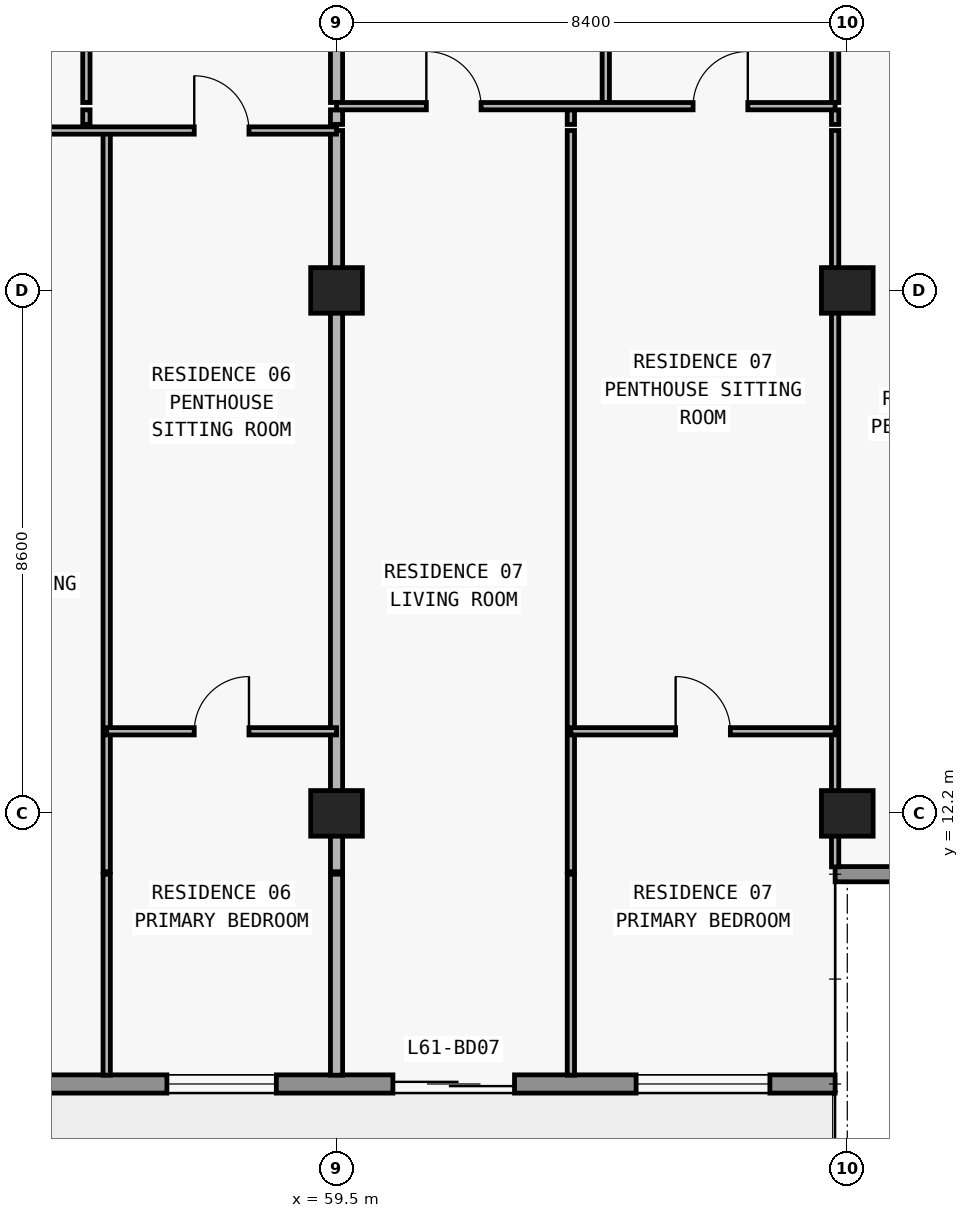
"""IFC4 building model, lengths in metres.
Left out: names, types, materials, properties, quantities, classifications, styles, units other than length and angle.
Written with IfcOpenShell. Run it as: python <this file> out.ifc"""

import sys

from ifc_helpers import new_model, si_unit, direction, frame, frame_2d, origin, origin_2d, place, context, subcontext, project, spatial, rectangle, extrude, element, fill, save


model = new_model("IFC4")
c1 = context("Model", 3, precision=1e-05, world=origin(), true_north=direction((0.0, 1.0)))
c2 = subcontext(c1, "Body", "Model", "MODEL_VIEW")
j1 = project(units=[si_unit("LENGTHUNIT", "METRE"), si_unit("PLANEANGLEUNIT", "RADIAN")], contexts=[c1])
p1 = place(None, origin())
s1 = spatial("IfcSite", under=j1, at=p1, CompositionType="ELEMENT")
p2 = place(p1, origin())
s2 = spatial("IfcBuilding", under=s1, at=p2, CompositionType="ELEMENT")
p3 = place(p2, frame((0.0, 0.0, 218.1)))
s3 = spatial("IfcBuildingStorey", under=s2, at=p3, CompositionType="ELEMENT", Elevation=218.1)
for number, where, z_axis, x_axis in (
    (1, (59.5, 12.2, 0.0), (0.0, 0.0, 1.0), (1.0, 0.0, 0.0)),
    (2, (67.9, 12.2, 0.0), (0.0, 0.0, 1.0), (1.0, 0.0, 0.0)),
    (3, (59.5, 20.8, 0.0), (0.0, 0.0, 1.0), (1.0, 0.0, 0.0)),
    (4, (67.9, 20.8, 0.0), (0.0, 0.0, 1.0), (1.0, 0.0, 0.0)),
):
    element("IfcColumn", number, at=place(p3, frame(where, z_axis=z_axis, x_axis=x_axis)), inside=s3, PredefinedType="COLUMN", context=c2, shape_type="SweptSolid", body=[
        extrude(rectangle(XDim=0.85, YDim=0.75, at=origin_2d()), origin(), (0.0, 0.0, 1.0), 3.0),
    ])
p4 = place(p3, frame((67.7, 7.75, 0.0), z_axis=(0.0, 0.0, 1.0), x_axis=(-1.0, 0.0, 0.0)))
e5 = element("IfcWall", 5, at=p4, inside=s3, PredefinedType="STANDARD", context=c2, shape_type="SweptSolid", body=[
    extrude(rectangle(XDim=57.6, YDim=0.3, at=frame_2d((28.8, 0.0))), origin(), (0.0, 0.0, 1.0), 3.0),
])
p5 = place(p4, frame((54.673, 0.0, 0.0)))
e6 = element("IfcOpeningElement", 6, at=p5, cuts=e5, PredefinedType="OPENING", context=c2, shape_type="SweptSolid", body=[
    extrude(rectangle(XDim=2.0, YDim=2.3, at=frame_2d((1.0, 1.15))), frame((0.0, 0.16, 0.0), z_axis=(0.0, -1.0, 0.0), x_axis=(1.0, 0.0, 0.0)), (0.0, 0.0, 1.0), 0.32),
])
p6 = place(p4, frame((50.473, 0.0, 0.85)))
e7 = element("IfcOpeningElement", 7, at=p6, cuts=e5, PredefinedType="OPENING", context=c2, shape_type="SweptSolid", body=[
    extrude(rectangle(XDim=2.2, YDim=1.55, at=frame_2d((1.1, 0.775))), frame((0.0, 0.16, 0.0), z_axis=(0.0, -1.0, 0.0), x_axis=(1.0, 0.0, 0.0)), (0.0, 0.0, 1.0), 0.32),
])
p7 = place(p4, frame((46.09, 0.0, 0.0)))
e8 = element("IfcOpeningElement", 8, at=p7, cuts=e5, PredefinedType="OPENING", context=c2, shape_type="SweptSolid", body=[
    extrude(rectangle(XDim=2.0, YDim=2.3, at=frame_2d((1.0, 1.15))), frame((0.0, 0.16, 0.0), z_axis=(0.0, -1.0, 0.0), x_axis=(1.0, 0.0, 0.0)), (0.0, 0.0, 1.0), 0.32),
])
p8 = place(p4, frame((41.99, 0.0, 0.85)))
e9 = element("IfcOpeningElement", 9, at=p8, cuts=e5, PredefinedType="OPENING", context=c2, shape_type="SweptSolid", body=[
    extrude(rectangle(XDim=1.8, YDim=1.55, at=frame_2d((0.9, 0.775))), frame((0.0, 0.16, 0.0), z_axis=(0.0, -1.0, 0.0), x_axis=(1.0, 0.0, 0.0)), (0.0, 0.0, 1.0), 0.32),
])
p9 = place(p4, frame((38.026, 0.0, 0.0)))
e10 = element("IfcOpeningElement", 10, at=p9, cuts=e5, PredefinedType="OPENING", context=c2, shape_type="SweptSolid", body=[
    extrude(rectangle(XDim=2.0, YDim=2.3, at=frame_2d((1.0, 1.15))), frame((0.0, 0.16, 0.0), z_axis=(0.0, -1.0, 0.0), x_axis=(1.0, 0.0, 0.0)), (0.0, 0.0, 1.0), 0.32),
])
p10 = place(p4, frame((33.726, 0.0, 0.85)))
e11 = element("IfcOpeningElement", 11, at=p10, cuts=e5, PredefinedType="OPENING", context=c2, shape_type="SweptSolid", body=[
    extrude(rectangle(XDim=2.2, YDim=1.55, at=frame_2d((1.1, 0.775))), frame((0.0, 0.16, 0.0), z_axis=(0.0, -1.0, 0.0), x_axis=(1.0, 0.0, 0.0)), (0.0, 0.0, 1.0), 0.32),
])
p11 = place(p4, frame((29.51, 0.0, 0.0)))
e12 = element("IfcOpeningElement", 12, at=p11, cuts=e5, PredefinedType="OPENING", context=c2, shape_type="SweptSolid", body=[
    extrude(rectangle(XDim=2.0, YDim=2.3, at=frame_2d((1.0, 1.15))), frame((0.0, 0.16, 0.0), z_axis=(0.0, -1.0, 0.0), x_axis=(1.0, 0.0, 0.0)), (0.0, 0.0, 1.0), 0.32),
])
p12 = place(p4, frame((25.81, 0.0, 0.85)))
e13 = element("IfcOpeningElement", 13, at=p12, cuts=e5, PredefinedType="OPENING", context=c2, shape_type="SweptSolid", body=[
    extrude(rectangle(XDim=1.8, YDim=1.55, at=frame_2d((0.9, 0.775))), frame((0.0, 0.16, 0.0), z_axis=(0.0, -1.0, 0.0), x_axis=(1.0, 0.0, 0.0)), (0.0, 0.0, 1.0), 0.32),
])
p13 = place(p4, frame((22.026, 0.0, 0.0)))
e14 = element("IfcOpeningElement", 14, at=p13, cuts=e5, PredefinedType="OPENING", context=c2, shape_type="SweptSolid", body=[
    extrude(rectangle(XDim=2.0, YDim=2.3, at=frame_2d((1.0, 1.15))), frame((0.0, 0.16, 0.0), z_axis=(0.0, -1.0, 0.0), x_axis=(1.0, 0.0, 0.0)), (0.0, 0.0, 1.0), 0.32),
])
p14 = place(p4, frame((17.726, 0.0, 0.85)))
e15 = element("IfcOpeningElement", 15, at=p14, cuts=e5, PredefinedType="OPENING", context=c2, shape_type="SweptSolid", body=[
    extrude(rectangle(XDim=2.2, YDim=1.55, at=frame_2d((1.1, 0.775))), frame((0.0, 0.16, 0.0), z_axis=(0.0, -1.0, 0.0), x_axis=(1.0, 0.0, 0.0)), (0.0, 0.0, 1.0), 0.32),
])
p15 = place(p4, frame((13.29, 0.0, 0.0)))
e16 = element("IfcOpeningElement", 16, at=p15, cuts=e5, PredefinedType="OPENING", context=c2, shape_type="SweptSolid", body=[
    extrude(rectangle(XDim=2.0, YDim=2.3, at=frame_2d((1.0, 1.15))), frame((0.0, 0.16, 0.0), z_axis=(0.0, -1.0, 0.0), x_axis=(1.0, 0.0, 0.0)), (0.0, 0.0, 1.0), 0.32),
])
p16 = place(p4, frame((9.19, 0.0, 0.85)))
e17 = element("IfcOpeningElement", 17, at=p16, cuts=e5, PredefinedType="OPENING", context=c2, shape_type="SweptSolid", body=[
    extrude(rectangle(XDim=1.8, YDim=1.55, at=frame_2d((0.9, 0.775))), frame((0.0, 0.16, 0.0), z_axis=(0.0, -1.0, 0.0), x_axis=(1.0, 0.0, 0.0)), (0.0, 0.0, 1.0), 0.32),
])
p17 = place(p4, frame((5.273, 0.0, 0.0)))
e18 = element("IfcOpeningElement", 18, at=p17, cuts=e5, PredefinedType="OPENING", context=c2, shape_type="SweptSolid", body=[
    extrude(rectangle(XDim=2.0, YDim=2.3, at=frame_2d((1.0, 1.15))), frame((0.0, 0.16, 0.0), z_axis=(0.0, -1.0, 0.0), x_axis=(1.0, 0.0, 0.0)), (0.0, 0.0, 1.0), 0.32),
])
p18 = place(p4, frame((1.073, 0.0, 0.85)))
e19 = element("IfcOpeningElement", 19, at=p18, cuts=e5, PredefinedType="OPENING", context=c2, shape_type="SweptSolid", body=[
    extrude(rectangle(XDim=2.2, YDim=1.55, at=frame_2d((1.1, 0.775))), frame((0.0, 0.16, 0.0), z_axis=(0.0, -1.0, 0.0), x_axis=(1.0, 0.0, 0.0)), (0.0, 0.0, 1.0), 0.32),
])
p19 = place(p3, frame((67.7, 11.2, 0.0), z_axis=(0.0, 0.0, 1.0), x_axis=(1.0, 0.0, 0.0)))
e20 = element("IfcWall", 20, at=p19, inside=s3, PredefinedType="ELEMENTEDWALL", context=c2, shape_type="SweptSolid", body=[
    extrude(rectangle(XDim=3.85, YDim=0.25, at=frame_2d((1.925, 0.0))), origin(), (0.0, 0.0, 1.0), 3.0),
])
p20 = place(p3, frame((55.386, 23.53, 0.0), z_axis=(0.0, 0.0, 1.0), x_axis=(0.0, 1.0, 0.0)))
e21 = element("IfcWall", 21, at=p20, inside=s3, PredefinedType="PARTITIONING", context=c2, shape_type="SweptSolid", body=[
    extrude(rectangle(XDim=0.24, YDim=0.12, at=frame_2d((0.12, 0.0))), origin(), (0.0, 0.0, 1.0), 2.449),
])
p21 = place(p3, frame((55.386, 23.89, 0.0), z_axis=(0.0, 0.0, 1.0), x_axis=(0.0, 1.0, 0.0)))
e22 = element("IfcWall", 22, at=p21, inside=s3, PredefinedType="PARTITIONING", context=c2, shape_type="SweptSolid", body=[
    extrude(rectangle(XDim=4.69, YDim=0.12, at=frame_2d((2.345, 0.0))), origin(), (0.0, 0.0, 1.0), 2.449),
])
p22 = place(p21, frame((1.895, 0.0, 0.0)))
e23 = element("IfcOpeningElement", 23, at=p22, cuts=e22, PredefinedType="OPENING", context=c2, shape_type="SweptSolid", body=[
    extrude(rectangle(XDim=0.9, YDim=2.15, at=frame_2d((0.45, 1.075))), frame((0.0, 0.07, 0.0), z_axis=(0.0, -1.0, 0.0), x_axis=(1.0, 0.0, 0.0)), (0.0, 0.0, 1.0), 0.14),
])
p23 = place(p3, frame((55.72, 7.895, 0.0), z_axis=(0.0, 0.0, 1.0), x_axis=(0.0, 1.0, 0.0)))
e24 = element("IfcWall", 24, at=p23, inside=s3, PredefinedType="PARTITIONING", context=c2, shape_type="SweptSolid", body=[
    extrude(rectangle(XDim=3.305, YDim=0.12, at=frame_2d((1.652, 0.0))), origin(), (0.0, 0.0, 1.0), 3.0),
])
p24 = place(p3, frame((55.72, 11.24, 0.0), z_axis=(0.0, 0.0, 1.0), x_axis=(0.0, 1.0, 0.0)))
e25 = element("IfcWall", 25, at=p24, inside=s3, PredefinedType="PARTITIONING", context=c2, shape_type="SweptSolid", body=[
    extrude(rectangle(XDim=12.19, YDim=0.12, at=frame_2d((6.095, 0.0))), origin(), (0.0, 0.0, 1.0), 3.0),
])
p25 = place(p3, frame((59.5, 7.895, 0.0), z_axis=(0.0, 0.0, 1.0), x_axis=(0.0, 1.0, 0.0)))
e26 = element("IfcWall", 26, at=p25, inside=s3, PredefinedType="PARTITIONING", context=c2, shape_type="SweptSolid", body=[
    extrude(rectangle(XDim=3.305, YDim=0.2, at=frame_2d((1.652, 0.0))), origin(), (0.0, 0.0, 1.0), 3.0),
])
p26 = place(p3, frame((59.5, 11.24, 0.0), z_axis=(0.0, 0.0, 1.0), x_axis=(0.0, 1.0, 0.0)))
e27 = element("IfcWall", 27, at=p26, inside=s3, PredefinedType="PARTITIONING", context=c2, shape_type="SweptSolid", body=[
    extrude(rectangle(XDim=12.19, YDim=0.2, at=frame_2d((6.095, 0.0))), origin(), (0.0, 0.0, 1.0), 2.213),
])
p27 = place(p3, frame((59.5, 23.53, 0.0), z_axis=(0.0, 0.0, 1.0), x_axis=(0.0, 1.0, 0.0)))
e28 = element("IfcWall", 28, at=p27, inside=s3, PredefinedType="PARTITIONING", context=c2, shape_type="SweptSolid", body=[
    extrude(rectangle(XDim=0.24, YDim=0.2, at=frame_2d((0.12, 0.0))), origin(), (0.0, 0.0, 1.0), 2.213),
])
p28 = place(p3, frame((59.5, 23.89, 0.0), z_axis=(0.0, 0.0, 1.0), x_axis=(0.0, 1.0, 0.0)))
e29 = element("IfcWall", 29, at=p28, inside=s3, PredefinedType="PARTITIONING", context=c2, shape_type="SweptSolid", body=[
    extrude(rectangle(XDim=4.69, YDim=0.2, at=frame_2d((2.345, 0.0))), origin(), (0.0, 0.0, 1.0), 2.213),
])
p29 = place(p3, frame((63.354, 7.895, 0.0), z_axis=(0.0, 0.0, 1.0), x_axis=(0.0, 1.0, 0.0)))
e30 = element("IfcWall", 30, at=p29, inside=s3, PredefinedType="PARTITIONING", context=c2, shape_type="SweptSolid", body=[
    extrude(rectangle(XDim=3.305, YDim=0.12, at=frame_2d((1.652, 0.0))), origin(), (0.0, 0.0, 1.0), 3.0),
])
p30 = place(p3, frame((63.354, 11.24, 0.0), z_axis=(0.0, 0.0, 1.0), x_axis=(0.0, 1.0, 0.0)))
e31 = element("IfcWall", 31, at=p30, inside=s3, PredefinedType="PARTITIONING", context=c2, shape_type="SweptSolid", body=[
    extrude(rectangle(XDim=12.19, YDim=0.12, at=frame_2d((6.095, 0.0))), origin(), (0.0, 0.0, 1.0), 3.0),
])
p31 = place(p3, frame((63.354, 23.53, 0.0), z_axis=(0.0, 0.0, 1.0), x_axis=(0.0, 1.0, 0.0)))
e32 = element("IfcWall", 32, at=p31, inside=s3, PredefinedType="PARTITIONING", context=c2, shape_type="SweptSolid", body=[
    extrude(rectangle(XDim=0.24, YDim=0.12, at=frame_2d((0.12, 0.0))), origin(), (0.0, 0.0, 1.0), 3.0),
])
p32 = place(p3, frame((63.928, 23.89, 0.0), z_axis=(0.0, 0.0, 1.0), x_axis=(0.0, 1.0, 0.0)))
e33 = element("IfcWall", 33, at=p32, inside=s3, PredefinedType="PARTITIONING", context=c2, shape_type="SweptSolid", body=[
    extrude(rectangle(XDim=4.69, YDim=0.12, at=frame_2d((2.345, 0.0))), origin(), (0.0, 0.0, 1.0), 2.449),
])
p33 = place(p32, frame((1.895, 0.0, 0.0)))
e34 = element("IfcOpeningElement", 34, at=p33, cuts=e33, PredefinedType="OPENING", context=c2, shape_type="SweptSolid", body=[
    extrude(rectangle(XDim=0.9, YDim=2.15, at=frame_2d((0.45, 1.075))), frame((0.0, 0.07, 0.0), z_axis=(0.0, -1.0, 0.0), x_axis=(1.0, 0.0, 0.0)), (0.0, 0.0, 1.0), 0.14),
])
p34 = place(p3, frame((67.7, 11.32, 0.0), z_axis=(0.0, 0.0, 1.0), x_axis=(0.0, 1.0, 0.0)))
e35 = element("IfcWall", 35, at=p34, inside=s3, PredefinedType="PARTITIONING", context=c2, shape_type="SweptSolid", body=[
    extrude(rectangle(XDim=12.11, YDim=0.12, at=frame_2d((6.055, 0.0))), origin(), (0.0, 0.0, 1.0), 2.213),
])
p35 = place(p3, frame((67.7, 23.53, 0.0), z_axis=(0.0, 0.0, 1.0), x_axis=(0.0, 1.0, 0.0)))
e36 = element("IfcWall", 36, at=p35, inside=s3, PredefinedType="PARTITIONING", context=c2, shape_type="SweptSolid", body=[
    extrude(rectangle(XDim=0.24, YDim=0.12, at=frame_2d((0.12, 0.0))), origin(), (0.0, 0.0, 1.0), 2.213),
])
p36 = place(p3, frame((67.7, 23.89, 0.0), z_axis=(0.0, 0.0, 1.0), x_axis=(0.0, 1.0, 0.0)))
e37 = element("IfcWall", 37, at=p36, inside=s3, PredefinedType="PARTITIONING", context=c2, shape_type="SweptSolid", body=[
    extrude(rectangle(XDim=4.69, YDim=0.12, at=frame_2d((2.345, 0.0))), origin(), (0.0, 0.0, 1.0), 2.213),
])
p37 = place(p36, frame((1.895, 0.0, 0.0)))
e38 = element("IfcOpeningElement", 38, at=p37, cuts=e37, PredefinedType="OPENING", context=c2, shape_type="SweptSolid", body=[
    extrude(rectangle(XDim=0.9, YDim=2.15, at=frame_2d((0.45, 1.075))), frame((0.0, 0.07, 0.0), z_axis=(0.0, -1.0, 0.0), x_axis=(1.0, 0.0, 0.0)), (0.0, 0.0, 1.0), 0.14),
])
p38 = place(p3, frame((55.72, 13.55, 0.0), z_axis=(0.0, 0.0, 1.0), x_axis=(1.0, 0.0, 0.0)))
e39 = element("IfcWall", 39, at=p38, inside=s3, PredefinedType="PARTITIONING", context=c2, shape_type="SweptSolid", body=[
    extrude(rectangle(XDim=3.78, YDim=0.12, at=frame_2d((1.89, 0.0))), origin(), (0.0, 0.0, 1.0), 3.0),
])
p39 = place(p38, frame((1.44, 0.0, 0.0)))
e40 = element("IfcOpeningElement", 40, at=p39, cuts=e39, PredefinedType="OPENING", context=c2, shape_type="SweptSolid", body=[
    extrude(rectangle(XDim=0.9, YDim=2.15, at=frame_2d((0.45, 1.075))), frame((0.0, 0.07, 0.0), z_axis=(0.0, -1.0, 0.0), x_axis=(1.0, 0.0, 0.0)), (0.0, 0.0, 1.0), 0.14),
])
p40 = place(p3, frame((63.354, 13.55, 0.0), z_axis=(0.0, 0.0, 1.0), x_axis=(1.0, 0.0, 0.0)))
e41 = element("IfcWall", 41, at=p40, inside=s3, PredefinedType="PARTITIONING", context=c2, shape_type="SweptSolid", body=[
    extrude(rectangle(XDim=4.346, YDim=0.12, at=frame_2d((2.173, 0.0))), origin(), (0.0, 0.0, 1.0), 3.0),
])
p41 = place(p40, frame((1.723, 0.0, 0.0)))
e42 = element("IfcOpeningElement", 42, at=p41, cuts=e41, PredefinedType="OPENING", context=c2, shape_type="SweptSolid", body=[
    extrude(rectangle(XDim=0.9, YDim=2.15, at=frame_2d((0.45, 1.075))), frame((0.0, 0.07, 0.0), z_axis=(0.0, -1.0, 0.0), x_axis=(1.0, 0.0, 0.0)), (0.0, 0.0, 1.0), 0.14),
])
p42 = place(p3, frame((51.32, 23.43, 0.0), z_axis=(0.0, 0.0, 1.0), x_axis=(1.0, 0.0, 0.0)))
e43 = element("IfcWall", 43, at=p42, inside=s3, PredefinedType="PARTITIONING", context=c2, shape_type="SweptSolid", body=[
    extrude(rectangle(XDim=8.18, YDim=0.12, at=frame_2d((4.09, 0.0))), origin(), (0.0, 0.0, 1.0), 3.0),
])
p43 = place(p42, frame((1.583, 0.0, 0.0)))
e44 = element("IfcOpeningElement", 44, at=p43, cuts=e43, PredefinedType="OPENING", context=c2, shape_type="SweptSolid", body=[
    extrude(rectangle(XDim=0.9, YDim=2.15, at=frame_2d((0.45, 1.075))), frame((0.0, 0.07, 0.0), z_axis=(0.0, -1.0, 0.0), x_axis=(1.0, 0.0, 0.0)), (0.0, 0.0, 1.0), 0.14),
])
p44 = place(p42, frame((5.84, 0.0, 0.0)))
e45 = element("IfcOpeningElement", 45, at=p44, cuts=e43, PredefinedType="OPENING", context=c2, shape_type="SweptSolid", body=[
    extrude(rectangle(XDim=0.9, YDim=2.15, at=frame_2d((0.45, 1.075))), frame((0.0, 0.07, 0.0), z_axis=(0.0, -1.0, 0.0), x_axis=(1.0, 0.0, 0.0)), (0.0, 0.0, 1.0), 0.14),
])
p45 = place(p3, frame((59.5, 23.83, 0.0), z_axis=(0.0, 0.0, 1.0), x_axis=(1.0, 0.0, 0.0)))
e46 = element("IfcWall", 46, at=p45, inside=s3, PredefinedType="PARTITIONING", context=c2, shape_type="SweptSolid", body=[
    extrude(rectangle(XDim=8.2, YDim=0.12, at=frame_2d((4.1, 0.0))), origin(), (0.0, 0.0, 1.0), 3.0),
])
p46 = place(p45, frame((1.477, 0.0, 0.0)))
e47 = element("IfcOpeningElement", 47, at=p46, cuts=e46, PredefinedType="OPENING", context=c2, shape_type="SweptSolid", body=[
    extrude(rectangle(XDim=0.9, YDim=2.15, at=frame_2d((0.45, 1.075))), frame((0.0, 0.07, 0.0), z_axis=(0.0, -1.0, 0.0), x_axis=(1.0, 0.0, 0.0)), (0.0, 0.0, 1.0), 0.14),
])
p47 = place(p45, frame((5.864, 0.0, 0.0)))
e48 = element("IfcOpeningElement", 48, at=p47, cuts=e46, PredefinedType="OPENING", context=c2, shape_type="SweptSolid", body=[
    extrude(rectangle(XDim=0.9, YDim=2.15, at=frame_2d((0.45, 1.075))), frame((0.0, 0.07, 0.0), z_axis=(0.0, -1.0, 0.0), x_axis=(1.0, 0.0, 0.0)), (0.0, 0.0, 1.0), 0.14),
])
p48 = place(p16, origin())
e49 = element("IfcWindow", 49, at=p48, inside=s3, PartitioningType="SINGLE_PANEL", PredefinedType="WINDOW", context=c2, shape_type="SweptSolid", body=[
    extrude(rectangle(XDim=1.8, YDim=1.55, at=frame_2d((0.9, 0.775))), frame((0.0, 0.03, 0.0), z_axis=(0.0, -1.0, 0.0), x_axis=(1.0, 0.0, 0.0)), (0.0, 0.0, 1.0), 0.06),
])
fill(e17, e49)
p49 = place(p17, origin())
e50 = element("IfcDoor", 50, at=p49, inside=s3, OperationType="DOUBLE_DOOR_SLIDING", PredefinedType="DOOR", context=c2, shape_type="SweptSolid", body=[
    extrude(rectangle(XDim=2.0, YDim=2.3, at=frame_2d((1.0, 1.15))), frame((0.0, 0.025, 0.0), z_axis=(0.0, -1.0, 0.0), x_axis=(1.0, 0.0, 0.0)), (0.0, 0.0, 1.0), 0.05),
])
fill(e18, e50)
p50 = place(p18, origin())
e51 = element("IfcWindow", 51, at=p50, inside=s3, PartitioningType="SINGLE_PANEL", PredefinedType="WINDOW", context=c2, shape_type="SweptSolid", body=[
    extrude(rectangle(XDim=2.2, YDim=1.55, at=frame_2d((1.1, 0.775))), frame((0.0, 0.03, 0.0), z_axis=(0.0, -1.0, 0.0), x_axis=(1.0, 0.0, 0.0)), (0.0, 0.0, 1.0), 0.06),
])
fill(e19, e51)
p51 = place(p44, origin())
e52 = element("IfcDoor", 52, at=p51, inside=s3, OperationType="SINGLE_SWING_LEFT", PredefinedType="DOOR", context=c2, shape_type="SweptSolid", body=[
    extrude(rectangle(XDim=0.9, YDim=2.15, at=frame_2d((0.45, 1.075))), frame((0.0, 0.025, 0.0), z_axis=(0.0, -1.0, 0.0), x_axis=(1.0, 0.0, 0.0)), (0.0, 0.0, 1.0), 0.05),
])
fill(e45, e52)
p52 = place(p39, origin())
e53 = element("IfcDoor", 53, at=p52, inside=s3, OperationType="SINGLE_SWING_RIGHT", PredefinedType="DOOR", context=c2, shape_type="SweptSolid", body=[
    extrude(rectangle(XDim=0.9, YDim=2.15, at=frame_2d((0.45, 1.075))), frame((0.0, 0.025, 0.0), z_axis=(0.0, -1.0, 0.0), x_axis=(1.0, 0.0, 0.0)), (0.0, 0.0, 1.0), 0.05),
])
fill(e40, e53)
p53 = place(p46, origin())
e54 = element("IfcDoor", 54, at=p53, inside=s3, OperationType="SINGLE_SWING_LEFT", PredefinedType="DOOR", context=c2, shape_type="SweptSolid", body=[
    extrude(rectangle(XDim=0.9, YDim=2.15, at=frame_2d((0.45, 1.075))), frame((0.0, 0.025, 0.0), z_axis=(0.0, -1.0, 0.0), x_axis=(1.0, 0.0, 0.0)), (0.0, 0.0, 1.0), 0.05),
])
fill(e47, e54)
p54 = place(p47, origin())
e55 = element("IfcDoor", 55, at=p54, inside=s3, OperationType="SINGLE_SWING_RIGHT", PredefinedType="DOOR", context=c2, shape_type="SweptSolid", body=[
    extrude(rectangle(XDim=0.9, YDim=2.15, at=frame_2d((0.45, 1.075))), frame((0.0, 0.025, 0.0), z_axis=(0.0, -1.0, 0.0), x_axis=(1.0, 0.0, 0.0)), (0.0, 0.0, 1.0), 0.05),
])
fill(e48, e55)
p55 = place(p41, origin())
e56 = element("IfcDoor", 56, at=p55, inside=s3, OperationType="SINGLE_SWING_LEFT", PredefinedType="DOOR", context=c2, shape_type="SweptSolid", body=[
    extrude(rectangle(XDim=0.9, YDim=2.15, at=frame_2d((0.45, 1.075))), frame((0.0, 0.025, 0.0), z_axis=(0.0, -1.0, 0.0), x_axis=(1.0, 0.0, 0.0)), (0.0, 0.0, 1.0), 0.05),
])
fill(e42, e56)
save(model, sys.argv[1])
